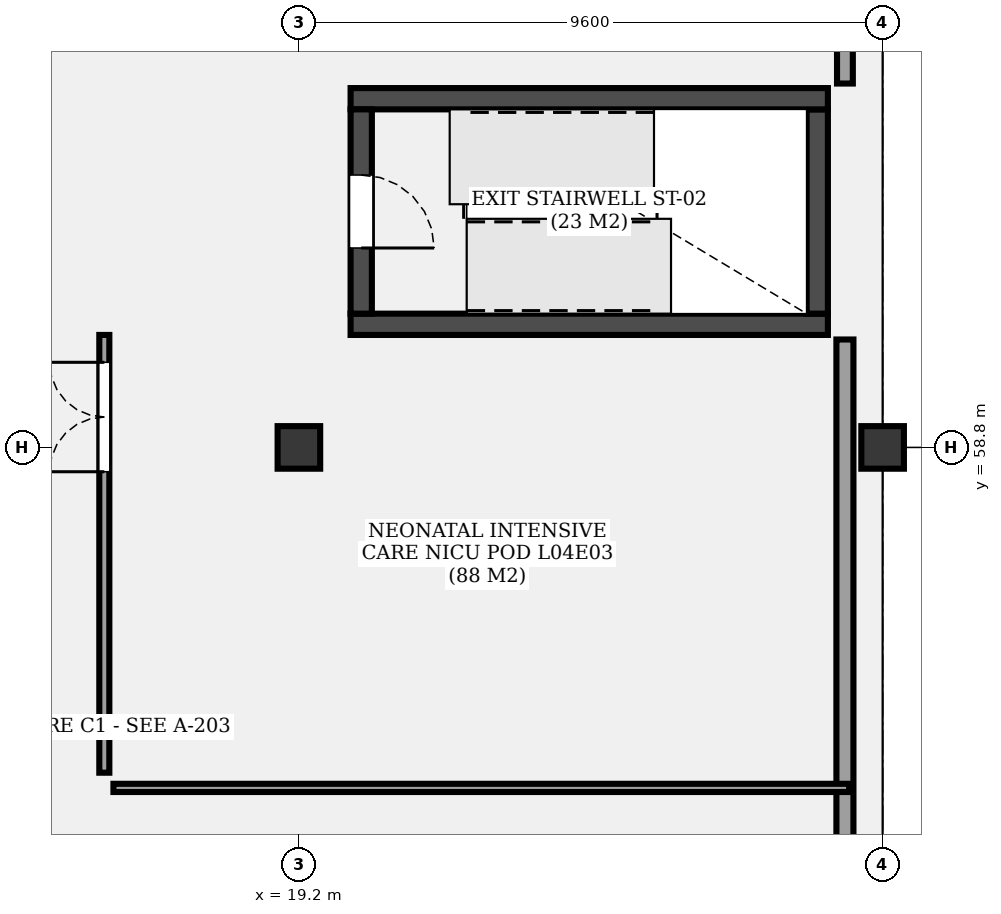
"""IFC4 building model, lengths in metres.
Left out: names, types, materials, properties, quantities, classifications, styles, units other than length and angle.
Written with IfcOpenShell. Run it as: python <this file> out.ifc"""

import sys

from ifc_helpers import new_model, si_unit, direction, frame, frame_2d, origin, origin_2d, place, context, subcontext, project, spatial, rectangle, extrude, element, fill, save


model = new_model("IFC4")
c1 = context("Model", 3, precision=1e-05, world=origin(), true_north=direction((0.0, 1.0)))
c2 = subcontext(c1, "Body", "Model", "MODEL_VIEW")
j1 = project(units=[si_unit("LENGTHUNIT", "METRE"), si_unit("PLANEANGLEUNIT", "RADIAN")], contexts=[c1])
p1 = place(None, origin())
s1 = spatial("IfcSite", under=j1, at=p1, CompositionType="ELEMENT")
p2 = place(p1, origin())
s2 = spatial("IfcBuilding", under=s1, at=p2, CompositionType="ELEMENT")
p3 = place(p2, frame((0.0, 0.0, 17.8)))
s3 = spatial("IfcBuildingStorey", under=s2, at=p3, CompositionType="ELEMENT", Elevation=17.8)
for number, where, z_axis, x_axis in (
    (1, (19.2, 58.8, 0.0), (0.0, 0.0, 1.0), (1.0, 0.0, 0.0)),
    (2, (28.8, 58.8, 0.0), (0.0, 0.0, 1.0), (1.0, 0.0, 0.0)),
):
    element("IfcColumn", number, at=place(p3, frame(where, z_axis=z_axis, x_axis=x_axis)), inside=s3, PredefinedType="COLUMN", context=c2, shape_type="SweptSolid", body=[
        extrude(rectangle(XDim=0.7, YDim=0.7, at=origin_2d()), origin(), (0.0, 0.0, 1.0), 4.2),
    ])
p4 = place(p3, frame((20.05, 60.825, 0.0), z_axis=(0.0, 0.0, 1.0), x_axis=(1.0, 0.0, 0.0)))
e3 = element("IfcWall", 3, at=p4, inside=s3, PredefinedType="SHEAR", context=c2, shape_type="SweptSolid", body=[
    extrude(rectangle(XDim=7.85, YDim=0.35, at=frame_2d((3.925, 0.0))), origin(), (0.0, 0.0, 1.0), 4.2),
])
p5 = place(p3, frame((27.725, 61.0, 0.0), z_axis=(0.0, 0.0, 1.0), x_axis=(0.0, 1.0, 0.0)))
e4 = element("IfcWall", 4, at=p5, inside=s3, PredefinedType="SHEAR", context=c2, shape_type="SweptSolid", body=[
    extrude(rectangle(XDim=3.36, YDim=0.35, at=frame_2d((1.68, 0.0))), origin(), (0.0, 0.0, 1.0), 4.2),
])
p6 = place(p3, frame((27.9, 64.535, 0.0), z_axis=(0.0, 0.0, 1.0), x_axis=(-1.0, 0.0, 0.0)))
e5 = element("IfcWall", 5, at=p6, inside=s3, PredefinedType="SHEAR", context=c2, shape_type="SweptSolid", body=[
    extrude(rectangle(XDim=7.85, YDim=0.35, at=frame_2d((3.925, 0.0))), origin(), (0.0, 0.0, 1.0), 4.2),
])
p7 = place(p3, frame((20.225, 64.36, 0.0), z_axis=(0.0, 0.0, 1.0), x_axis=(0.0, -1.0, 0.0)))
e6 = element("IfcWall", 6, at=p7, inside=s3, PredefinedType="SHEAR", context=c2, shape_type="SweptSolid", body=[
    extrude(rectangle(XDim=3.36, YDim=0.35, at=frame_2d((1.68, 0.0))), origin(), (0.0, 0.0, 1.0), 4.2),
])
p8 = place(p7, frame((1.08, 0.0, 0.0)))
e7 = element("IfcOpeningElement", 7, at=p8, cuts=e6, PredefinedType="OPENING", context=c2, shape_type="SweptSolid", body=[
    extrude(rectangle(XDim=1.2, YDim=2.2, at=frame_2d((0.6, 1.1))), frame((0.0, 0.185, 0.0), z_axis=(0.0, -1.0, 0.0), x_axis=(1.0, 0.0, 0.0)), (0.0, 0.0, 1.0), 0.37),
])
p9 = place(p3, frame((28.18, 66.78, 0.0), z_axis=(0.0, 0.0, 1.0), x_axis=(0.0, -1.0, 0.0)))
e8 = element("IfcWall", 8, at=p9, inside=s3, PredefinedType="SOLIDWALL", context=c2, shape_type="SweptSolid", body=[
    extrude(rectangle(XDim=1.995, YDim=0.26, at=frame_2d((0.998, 0.0))), origin(), (0.0, 0.0, 1.0), 3.39),
])
p10 = place(p3, frame((28.18, 60.575, 0.0), z_axis=(0.0, 0.0, 1.0), x_axis=(0.0, -1.0, 0.0)))
e9 = element("IfcWall", 9, at=p10, inside=s3, PredefinedType="SOLIDWALL", context=c2, shape_type="SweptSolid", body=[
    extrude(rectangle(XDim=12.615, YDim=0.28, at=frame_2d((6.308, 0.0))), origin(), (0.0, 0.0, 1.0), 3.39),
])
p11 = place(p3, frame((16.0, 53.45, 0.0), z_axis=(0.0, 0.0, 1.0), x_axis=(0.0, 1.0, 0.0)))
e10 = element("IfcWall", 10, at=p11, inside=s3, PredefinedType="PARTITIONING", context=c2, shape_type="SweptSolid", body=[
    extrude(rectangle(XDim=7.2, YDim=0.165, at=frame_2d((3.6, 0.0))), origin(), (0.0, 0.0, 1.0), 3.3),
])
p12 = place(p11, frame((4.95, 0.0, 0.0)))
e11 = element("IfcOpeningElement", 11, at=p12, cuts=e10, PredefinedType="OPENING", context=c2, shape_type="SweptSolid", body=[
    extrude(rectangle(XDim=1.8, YDim=2.4, at=frame_2d((0.9, 1.2))), frame((0.0, 0.093, 0.0), z_axis=(0.0, -1.0, 0.0), x_axis=(1.0, 0.0, 0.0)), (0.0, 0.0, 1.0), 0.185),
])
p13 = place(p3, frame((16.15, 53.2, 0.0), z_axis=(0.0, 0.0, 1.0), x_axis=(1.0, 0.0, 0.0)))
e12 = element("IfcWall", 12, at=p13, inside=s3, PredefinedType="PARTITIONING", context=c2, shape_type="SweptSolid", body=[
    extrude(rectangle(XDim=12.1, YDim=0.135, at=frame_2d((6.05, 0.0))), origin(), (0.0, 0.0, 1.0), 3.3),
])
p14 = place(p8, origin())
e13 = element("IfcDoor", 13, at=p14, inside=s3, OperationType="SINGLE_SWING_RIGHT", PredefinedType="DOOR", context=c2, shape_type="SweptSolid", body=[
    extrude(rectangle(XDim=1.2, YDim=2.2, at=frame_2d((0.6, 1.1))), frame((0.0, 0.025, 0.0), z_axis=(0.0, -1.0, 0.0), x_axis=(1.0, 0.0, 0.0)), (0.0, 0.0, 1.0), 0.05),
])
fill(e7, e13)
p15 = place(p12, origin())
e14 = element("IfcDoor", 14, at=p15, inside=s3, OperationType="DOUBLE_DOOR_SINGLE_SWING", PredefinedType="DOOR", context=c2, shape_type="SweptSolid", body=[
    extrude(rectangle(XDim=1.8, YDim=2.4, at=frame_2d((0.9, 1.2))), frame((0.0, 0.025, 0.0), z_axis=(0.0, -1.0, 0.0), x_axis=(1.0, 0.0, 0.0)), (0.0, 0.0, 1.0), 0.05),
])
fill(e11, e14)
save(model, sys.argv[1])
